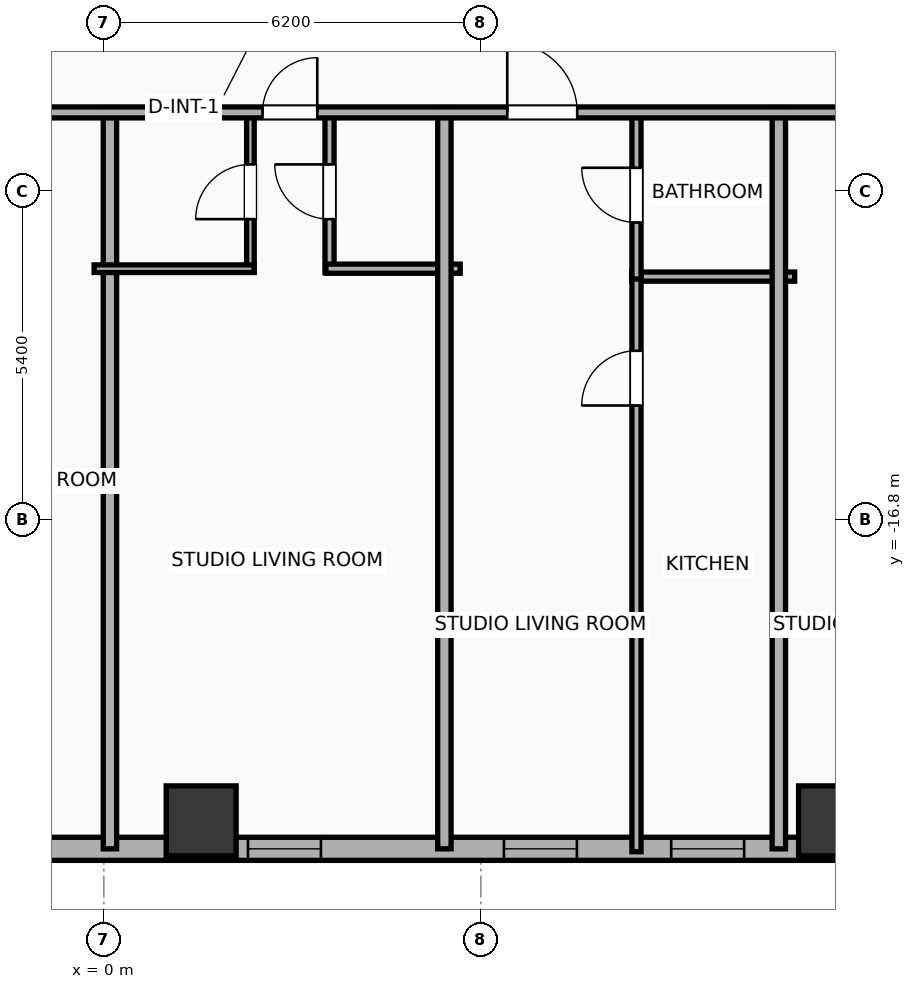
"""IFC4 building model, lengths in metres.
Left out: names, types, materials, properties, quantities, classifications, styles, units other than length and angle.
Written with IfcOpenShell. Run it as: python <this file> out.ifc"""

import sys

from ifc_helpers import new_model, si_unit, direction, frame, frame_2d, origin, origin_2d, place, context, subcontext, project, spatial, rectangle, hollow_rectangle, extrude, element, fill, save


model = new_model("IFC4")
c1 = context("Model", 3, precision=1e-05, world=origin(), true_north=direction((0.0, 1.0)))
c2 = subcontext(c1, "Body", "Model", "MODEL_VIEW")
j1 = project(units=[si_unit("LENGTHUNIT", "METRE"), si_unit("PLANEANGLEUNIT", "RADIAN")], contexts=[c1])
p1 = place(None, origin())
s1 = spatial("IfcSite", under=j1, at=p1, CompositionType="ELEMENT")
p2 = place(p1, origin())
s2 = spatial("IfcBuilding", under=s1, at=p2, CompositionType="ELEMENT")
p3 = place(p2, frame((0.0, 0.0, 45.5)))
s3 = spatial("IfcBuildingStorey", under=s2, at=p3, CompositionType="ELEMENT", Elevation=45.5)
for number, where, z_axis, x_axis in (
    (1, (1.6, -21.75, 0.0), (0.0, 0.0, 1.0), (1.0, 0.0, 0.0)),
    (2, (12.0, -21.75, 0.0), (0.0, 0.0, 1.0), (1.0, 0.0, 0.0)),
):
    element("IfcColumn", number, at=place(p3, frame(where, z_axis=z_axis, x_axis=x_axis)), inside=s3, PredefinedType="COLUMN", context=c2, shape_type="SweptSolid", body=[
        extrude(hollow_rectangle(XDim=1.15, YDim=1.15, WallThickness=0.04, at=origin_2d()), origin(), (0.0, 0.0, 1.0), 3.9),
    ])
p4 = place(p3, frame((22.381, -22.21, 0.0), z_axis=(0.0, 0.0, 1.0), x_axis=(-1.0, 0.0, 0.0)))
e3 = element("IfcWall", 3, at=p4, inside=s3, PredefinedType="ELEMENTEDWALL", context=c2, shape_type="SweptSolid", body=[
    extrude(rectangle(XDim=51.963, YDim=0.38, at=frame_2d((25.981, 0.0))), origin(), (0.0, 0.0, 1.0), 3.65),
])
p5 = place(p4, frame((42.952, 0.0, 0.75)))
e4 = element("IfcOpeningElement", 4, at=p5, cuts=e3, PredefinedType="OPENING", context=c2, shape_type="SweptSolid", body=[
    extrude(rectangle(XDim=2.4, YDim=2.1, at=frame_2d((1.2, 1.05))), frame((0.0, 0.2, 0.0), z_axis=(0.0, -1.0, 0.0), x_axis=(1.0, 0.0, 0.0)), (0.0, 0.0, 1.0), 0.4),
])
p6 = place(p4, frame((49.847, 0.0, 0.75)))
e5 = element("IfcOpeningElement", 5, at=p6, cuts=e3, PredefinedType="OPENING", context=c2, shape_type="SweptSolid", body=[
    extrude(rectangle(XDim=1.2, YDim=2.05, at=frame_2d((0.6, 1.025))), frame((0.0, 0.2, 0.0), z_axis=(0.0, -1.0, 0.0), x_axis=(1.0, 0.0, 0.0)), (0.0, 0.0, 1.0), 0.4),
])
p7 = place(p4, frame((47.445, 0.0, 0.75)))
e6 = element("IfcOpeningElement", 6, at=p7, cuts=e3, PredefinedType="OPENING", context=c2, shape_type="SweptSolid", body=[
    extrude(rectangle(XDim=1.2, YDim=2.05, at=frame_2d((0.6, 1.025))), frame((0.0, 0.2, 0.0), z_axis=(0.0, -1.0, 0.0), x_axis=(1.0, 0.0, 0.0)), (0.0, 0.0, 1.0), 0.4),
])
p8 = place(p4, frame((39.526, 0.0, 0.75)))
e7 = element("IfcOpeningElement", 7, at=p8, cuts=e3, PredefinedType="OPENING", context=c2, shape_type="SweptSolid", body=[
    extrude(rectangle(XDim=1.2, YDim=2.05, at=frame_2d((0.6, 1.025))), frame((0.0, 0.2, 0.0), z_axis=(0.0, -1.0, 0.0), x_axis=(1.0, 0.0, 0.0)), (0.0, 0.0, 1.0), 0.4),
])
p9 = place(p4, frame((33.018, 0.0, 0.75)))
e8 = element("IfcOpeningElement", 8, at=p9, cuts=e3, PredefinedType="OPENING", context=c2, shape_type="SweptSolid", body=[
    extrude(rectangle(XDim=1.2, YDim=2.05, at=frame_2d((0.6, 1.025))), frame((0.0, 0.2, 0.0), z_axis=(0.0, -1.0, 0.0), x_axis=(1.0, 0.0, 0.0)), (0.0, 0.0, 1.0), 0.4),
])
p10 = place(p4, frame((36.813, 0.0, 0.75)))
e9 = element("IfcOpeningElement", 9, at=p10, cuts=e3, PredefinedType="OPENING", context=c2, shape_type="SweptSolid", body=[
    extrude(rectangle(XDim=1.2, YDim=2.05, at=frame_2d((0.6, 1.025))), frame((0.0, 0.2, 0.0), z_axis=(0.0, -1.0, 0.0), x_axis=(1.0, 0.0, 0.0)), (0.0, 0.0, 1.0), 0.4),
])
p11 = place(p4, frame((28.886, 0.0, 0.75)))
e10 = element("IfcOpeningElement", 10, at=p11, cuts=e3, PredefinedType="OPENING", context=c2, shape_type="SweptSolid", body=[
    extrude(rectangle(XDim=1.2, YDim=2.05, at=frame_2d((0.6, 1.025))), frame((0.0, 0.2, 0.0), z_axis=(0.0, -1.0, 0.0), x_axis=(1.0, 0.0, 0.0)), (0.0, 0.0, 1.0), 0.4),
])
p12 = place(p4, frame((23.306, 0.0, 0.75)))
e11 = element("IfcOpeningElement", 11, at=p12, cuts=e3, PredefinedType="OPENING", context=c2, shape_type="SweptSolid", body=[
    extrude(rectangle(XDim=1.2, YDim=2.05, at=frame_2d((0.6, 1.025))), frame((0.0, 0.2, 0.0), z_axis=(0.0, -1.0, 0.0), x_axis=(1.0, 0.0, 0.0)), (0.0, 0.0, 1.0), 0.4),
])
p13 = place(p4, frame((26.056, 0.0, 0.75)))
e12 = element("IfcOpeningElement", 12, at=p13, cuts=e3, PredefinedType="OPENING", context=c2, shape_type="SweptSolid", body=[
    extrude(rectangle(XDim=1.2, YDim=2.05, at=frame_2d((0.6, 1.025))), frame((0.0, 0.2, 0.0), z_axis=(0.0, -1.0, 0.0), x_axis=(1.0, 0.0, 0.0)), (0.0, 0.0, 1.0), 0.4),
])
p14 = place(p4, frame((18.811, 0.0, 0.75)))
e13 = element("IfcOpeningElement", 13, at=p14, cuts=e3, PredefinedType="OPENING", context=c2, shape_type="SweptSolid", body=[
    extrude(rectangle(XDim=1.2, YDim=2.05, at=frame_2d((0.6, 1.025))), frame((0.0, 0.2, 0.0), z_axis=(0.0, -1.0, 0.0), x_axis=(1.0, 0.0, 0.0)), (0.0, 0.0, 1.0), 0.4),
])
p15 = place(p4, frame((14.602, 0.0, 0.75)))
e14 = element("IfcOpeningElement", 14, at=p15, cuts=e3, PredefinedType="OPENING", context=c2, shape_type="SweptSolid", body=[
    extrude(rectangle(XDim=1.2, YDim=2.05, at=frame_2d((0.6, 1.025))), frame((0.0, 0.2, 0.0), z_axis=(0.0, -1.0, 0.0), x_axis=(1.0, 0.0, 0.0)), (0.0, 0.0, 1.0), 0.4),
])
p16 = place(p4, frame((11.852, 0.0, 0.75)))
e15 = element("IfcOpeningElement", 15, at=p16, cuts=e3, PredefinedType="OPENING", context=c2, shape_type="SweptSolid", body=[
    extrude(rectangle(XDim=1.2, YDim=2.05, at=frame_2d((0.6, 1.025))), frame((0.0, 0.2, 0.0), z_axis=(0.0, -1.0, 0.0), x_axis=(1.0, 0.0, 0.0)), (0.0, 0.0, 1.0), 0.4),
])
p17 = place(p4, frame((8.316, 0.0, 0.75)))
e16 = element("IfcOpeningElement", 16, at=p17, cuts=e3, PredefinedType="OPENING", context=c2, shape_type="SweptSolid", body=[
    extrude(rectangle(XDim=1.2, YDim=2.05, at=frame_2d((0.6, 1.025))), frame((0.0, 0.2, 0.0), z_axis=(0.0, -1.0, 0.0), x_axis=(1.0, 0.0, 0.0)), (0.0, 0.0, 1.0), 0.4),
])
p18 = place(p4, frame((6.286, 0.0, 0.75)))
e17 = element("IfcOpeningElement", 17, at=p18, cuts=e3, PredefinedType="OPENING", context=c2, shape_type="SweptSolid", body=[
    extrude(rectangle(XDim=1.2, YDim=2.05, at=frame_2d((0.6, 1.025))), frame((0.0, 0.2, 0.0), z_axis=(0.0, -1.0, 0.0), x_axis=(1.0, 0.0, 0.0)), (0.0, 0.0, 1.0), 0.4),
])
p19 = place(p4, frame((3.737, 0.0, 0.75)))
e18 = element("IfcOpeningElement", 18, at=p19, cuts=e3, PredefinedType="OPENING", context=c2, shape_type="SweptSolid", body=[
    extrude(rectangle(XDim=1.2, YDim=2.05, at=frame_2d((0.6, 1.025))), frame((0.0, 0.2, 0.0), z_axis=(0.0, -1.0, 0.0), x_axis=(1.0, 0.0, 0.0)), (0.0, 0.0, 1.0), 0.4),
])
p20 = place(p4, frame((1.291, 0.0, 0.75)))
e19 = element("IfcOpeningElement", 19, at=p20, cuts=e3, PredefinedType="OPENING", context=c2, shape_type="SweptSolid", body=[
    extrude(rectangle(XDim=1.2, YDim=2.05, at=frame_2d((0.6, 1.025))), frame((0.0, 0.2, 0.0), z_axis=(0.0, -1.0, 0.0), x_axis=(1.0, 0.0, 0.0)), (0.0, 0.0, 1.0), 0.4),
])
p21 = place(p3, frame((0.1, -22.21, 0.0), z_axis=(0.0, 0.0, 1.0), x_axis=(0.0, 1.0, 0.0)))
e20 = element("IfcWall", 20, at=p21, inside=s3, PredefinedType="PARTITIONING", context=c2, shape_type="SweptSolid", body=[
    extrude(rectangle(XDim=12.19, YDim=0.22, at=frame_2d((6.095, 0.0))), origin(), (0.0, 0.0, 1.0), 3.65),
])
p22 = place(p3, frame((2.41, -12.73, 0.0), z_axis=(0.0, 0.0, 1.0), x_axis=(0.0, 1.0, 0.0)))
e21 = element("IfcWall", 21, at=p22, inside=s3, PredefinedType="PARTITIONING", context=c2, shape_type="SweptSolid", body=[
    extrude(rectangle(XDim=2.65, YDim=0.125, at=frame_2d((1.325, 0.0))), origin(), (0.0, 0.0, 1.0), 3.65),
])
p23 = place(p22, frame((0.875, 0.0, 0.0)))
e22 = element("IfcOpeningElement", 22, at=p23, cuts=e21, PredefinedType="OPENING", context=c2, shape_type="SweptSolid", body=[
    extrude(rectangle(XDim=0.9, YDim=2.05, at=frame_2d((0.45, 1.025))), frame((0.0, 0.073, 0.0), z_axis=(0.0, -1.0, 0.0), x_axis=(1.0, 0.0, 0.0)), (0.0, 0.0, 1.0), 0.145),
])
p24 = place(p3, frame((3.711, -12.73, 0.0), z_axis=(0.0, 0.0, 1.0), x_axis=(0.0, 1.0, 0.0)))
e23 = element("IfcWall", 23, at=p24, inside=s3, PredefinedType="PLUMBINGWALL", context=c2, shape_type="SweptSolid", body=[
    extrude(rectangle(XDim=2.65, YDim=0.15, at=frame_2d((1.325, 0.0))), origin(), (0.0, 0.0, 1.0), 2.94),
])
p25 = place(p24, frame((0.875, 0.0, 0.0)))
e24 = element("IfcOpeningElement", 24, at=p25, cuts=e23, PredefinedType="OPENING", context=c2, shape_type="SweptSolid", body=[
    extrude(rectangle(XDim=0.9, YDim=2.05, at=frame_2d((0.45, 1.025))), frame((0.0, 0.085, 0.0), z_axis=(0.0, -1.0, 0.0), x_axis=(1.0, 0.0, 0.0)), (0.0, 0.0, 1.0), 0.17),
])
p26 = place(p3, frame((-0.16, -12.67, 0.0), z_axis=(0.0, 0.0, 1.0), x_axis=(1.0, 0.0, 0.0)))
e25 = element("IfcWall", 25, at=p26, inside=s3, PredefinedType="PARTITIONING", context=c2, shape_type="SweptSolid", body=[
    extrude(rectangle(XDim=2.63, YDim=0.125, at=frame_2d((1.315, 0.0))), origin(), (0.0, 0.0, 1.0), 3.65),
])
p27 = place(p3, frame((3.651, -12.67, 0.0), z_axis=(0.0, 0.0, 1.0), x_axis=(1.0, 0.0, 0.0)))
e26 = element("IfcWall", 26, at=p27, inside=s3, PredefinedType="PLUMBINGWALL", context=c2, shape_type="SweptSolid", body=[
    extrude(rectangle(XDim=2.209, YDim=0.15, at=frame_2d((1.104, 0.0))), origin(), (0.0, 0.0, 1.0), 3.65),
])
p28 = place(p3, frame((5.6, -22.21, 0.0), z_axis=(0.0, 0.0, 1.0), x_axis=(0.0, 1.0, 0.0)))
e27 = element("IfcWall", 27, at=p28, inside=s3, PredefinedType="PARTITIONING", context=c2, shape_type="SweptSolid", body=[
    extrude(rectangle(XDim=12.19, YDim=0.22, at=frame_2d((6.095, 0.0))), origin(), (0.0, 0.0, 1.0), 3.65),
])
p29 = place(p3, frame((8.679, -12.8, 0.0), z_axis=(0.0, 0.0, 1.0), x_axis=(1.0, 0.0, 0.0)))
e28 = element("IfcWall", 28, at=p29, inside=s3, PredefinedType="PLUMBINGWALL", context=c2, shape_type="SweptSolid", body=[
    extrude(rectangle(XDim=2.681, YDim=0.15, at=frame_2d((1.341, 0.0))), origin(), (0.0, 0.0, 1.0), 3.65),
])
p30 = place(p3, frame((8.759, -22.258, 0.0), z_axis=(0.0, 0.0, 1.0), x_axis=(0.0, 1.0, 0.0)))
e29 = element("IfcWall", 29, at=p30, inside=s3, PredefinedType="PLUMBINGWALL", context=c2, shape_type="SweptSolid", body=[
    extrude(rectangle(XDim=9.498, YDim=0.15, at=frame_2d((4.749, 0.0))), origin(), (0.0, 0.0, 1.0), 3.65),
])
p31 = place(p30, frame((7.338, 0.0, 0.0)))
e30 = element("IfcOpeningElement", 30, at=p31, cuts=e29, PredefinedType="OPENING", context=c2, shape_type="SweptSolid", body=[
    extrude(rectangle(XDim=0.9, YDim=2.05, at=frame_2d((0.45, 1.025))), frame((0.0, 0.085, 0.0), z_axis=(0.0, -1.0, 0.0), x_axis=(1.0, 0.0, 0.0)), (0.0, 0.0, 1.0), 0.17),
])
p32 = place(p3, frame((8.759, -12.84, 0.0), z_axis=(0.0, 0.0, 1.0), x_axis=(0.0, 1.0, 0.0)))
e31 = element("IfcWall", 31, at=p32, inside=s3, PredefinedType="PLUMBINGWALL", context=c2, shape_type="SweptSolid", body=[
    extrude(rectangle(XDim=2.76, YDim=0.15, at=frame_2d((1.38, 0.0))), origin(), (0.0, 0.0, 1.0), 3.65),
])
p33 = place(p32, frame((0.93, 0.0, 0.0)))
e32 = element("IfcOpeningElement", 32, at=p33, cuts=e31, PredefinedType="OPENING", context=c2, shape_type="SweptSolid", body=[
    extrude(rectangle(XDim=0.9, YDim=2.05, at=frame_2d((0.45, 1.025))), frame((0.0, 0.085, 0.0), z_axis=(0.0, -1.0, 0.0), x_axis=(1.0, 0.0, 0.0)), (0.0, 0.0, 1.0), 0.17),
])
p34 = place(p3, frame((11.1, -22.21, 0.0), z_axis=(0.0, 0.0, 1.0), x_axis=(0.0, 1.0, 0.0)))
e33 = element("IfcWall", 33, at=p34, inside=s3, PredefinedType="PARTITIONING", context=c2, shape_type="SweptSolid", body=[
    extrude(rectangle(XDim=12.19, YDim=0.22, at=frame_2d((6.095, 0.0))), origin(), (0.0, 0.0, 1.0), 3.65),
])
p35 = place(p3, frame((-33.41, -10.1, 0.0), z_axis=(0.0, 0.0, 1.0), x_axis=(1.0, 0.0, 0.0)))
e34 = element("IfcWall", 34, at=p35, inside=s3, PredefinedType="PARTITIONING", context=c2, shape_type="SweptSolid", body=[
    extrude(rectangle(XDim=59.62, YDim=0.18, at=frame_2d((29.81, 0.0))), origin(), (0.0, 0.0, 1.0), 3.65),
])
p36 = place(p35, frame((2.746, 0.0, 0.0)))
e35 = element("IfcOpeningElement", 35, at=p36, cuts=e34, PredefinedType="OPENING", context=c2, shape_type="SweptSolid", body=[
    extrude(rectangle(XDim=0.9, YDim=2.05, at=frame_2d((0.45, 1.025))), frame((0.0, 0.1, 0.0), z_axis=(0.0, -1.0, 0.0), x_axis=(1.0, 0.0, 0.0)), (0.0, 0.0, 1.0), 0.2),
])
p37 = place(p35, frame((11.552, 0.0, 0.0)))
e36 = element("IfcOpeningElement", 36, at=p37, cuts=e34, PredefinedType="OPENING", context=c2, shape_type="SweptSolid", body=[
    extrude(rectangle(XDim=1.15, YDim=2.05, at=frame_2d((0.575, 1.025))), frame((0.0, 0.1, 0.0), z_axis=(0.0, -1.0, 0.0), x_axis=(1.0, 0.0, 0.0)), (0.0, 0.0, 1.0), 0.2),
])
p38 = place(p35, frame((22.379, 0.0, 0.0)))
e37 = element("IfcOpeningElement", 37, at=p38, cuts=e34, PredefinedType="OPENING", context=c2, shape_type="SweptSolid", body=[
    extrude(rectangle(XDim=1.15, YDim=2.05, at=frame_2d((0.575, 1.025))), frame((0.0, 0.1, 0.0), z_axis=(0.0, -1.0, 0.0), x_axis=(1.0, 0.0, 0.0)), (0.0, 0.0, 1.0), 0.2),
])
p39 = place(p35, frame((31.28, 0.0, 0.0)))
e38 = element("IfcOpeningElement", 38, at=p39, cuts=e34, PredefinedType="OPENING", context=c2, shape_type="SweptSolid", body=[
    extrude(rectangle(XDim=1.15, YDim=2.05, at=frame_2d((0.575, 1.025))), frame((0.0, 0.1, 0.0), z_axis=(0.0, -1.0, 0.0), x_axis=(1.0, 0.0, 0.0)), (0.0, 0.0, 1.0), 0.2),
])
p40 = place(p35, frame((36.02, 0.0, 0.0)))
e39 = element("IfcOpeningElement", 39, at=p40, cuts=e34, PredefinedType="OPENING", context=c2, shape_type="SweptSolid", body=[
    extrude(rectangle(XDim=0.9, YDim=2.05, at=frame_2d((0.45, 1.025))), frame((0.0, 0.1, 0.0), z_axis=(0.0, -1.0, 0.0), x_axis=(1.0, 0.0, 0.0)), (0.0, 0.0, 1.0), 0.2),
])
p41 = place(p35, frame((40.044, 0.0, 0.0)))
e40 = element("IfcOpeningElement", 40, at=p41, cuts=e34, PredefinedType="OPENING", context=c2, shape_type="SweptSolid", body=[
    extrude(rectangle(XDim=1.15, YDim=2.05, at=frame_2d((0.575, 1.025))), frame((0.0, 0.1, 0.0), z_axis=(0.0, -1.0, 0.0), x_axis=(1.0, 0.0, 0.0)), (0.0, 0.0, 1.0), 0.2),
])
p42 = place(p35, frame((45.613, 0.0, 0.0)))
e41 = element("IfcOpeningElement", 41, at=p42, cuts=e34, PredefinedType="OPENING", context=c2, shape_type="SweptSolid", body=[
    extrude(rectangle(XDim=1.15, YDim=2.05, at=frame_2d((0.575, 1.025))), frame((0.0, 0.1, 0.0), z_axis=(0.0, -1.0, 0.0), x_axis=(1.0, 0.0, 0.0)), (0.0, 0.0, 1.0), 0.2),
])
p43 = place(p35, frame((54.174, 0.0, 0.0)))
e42 = element("IfcOpeningElement", 42, at=p43, cuts=e34, PredefinedType="OPENING", context=c2, shape_type="SweptSolid", body=[
    extrude(rectangle(XDim=1.15, YDim=2.05, at=frame_2d((0.575, 1.025))), frame((0.0, 0.1, 0.0), z_axis=(0.0, -1.0, 0.0), x_axis=(1.0, 0.0, 0.0)), (0.0, 0.0, 1.0), 0.2),
])
p44 = place(p14, origin())
e43 = element("IfcWindow", 43, at=p44, inside=s3, PartitioningType="SINGLE_PANEL", PredefinedType="WINDOW", context=c2, shape_type="SweptSolid", body=[
    extrude(rectangle(XDim=1.2, YDim=2.05, at=frame_2d((0.6, 1.025))), frame((0.0, 0.03, 0.0), z_axis=(0.0, -1.0, 0.0), x_axis=(1.0, 0.0, 0.0)), (0.0, 0.0, 1.0), 0.06),
])
fill(e13, e43)
p45 = place(p15, origin())
e44 = element("IfcWindow", 44, at=p45, inside=s3, PartitioningType="SINGLE_PANEL", PredefinedType="WINDOW", context=c2, shape_type="SweptSolid", body=[
    extrude(rectangle(XDim=1.2, YDim=2.05, at=frame_2d((0.6, 1.025))), frame((0.0, 0.03, 0.0), z_axis=(0.0, -1.0, 0.0), x_axis=(1.0, 0.0, 0.0)), (0.0, 0.0, 1.0), 0.06),
])
fill(e14, e44)
p46 = place(p16, origin())
e45 = element("IfcWindow", 45, at=p46, inside=s3, PartitioningType="SINGLE_PANEL", PredefinedType="WINDOW", context=c2, shape_type="SweptSolid", body=[
    extrude(rectangle(XDim=1.2, YDim=2.05, at=frame_2d((0.6, 1.025))), frame((0.0, 0.03, 0.0), z_axis=(0.0, -1.0, 0.0), x_axis=(1.0, 0.0, 0.0)), (0.0, 0.0, 1.0), 0.06),
])
fill(e15, e45)
p47 = place(p23, origin())
e46 = element("IfcDoor", 46, at=p47, inside=s3, OperationType="SINGLE_SWING_LEFT", PredefinedType="DOOR", context=c2, shape_type="SweptSolid", body=[
    extrude(rectangle(XDim=0.9, YDim=2.05, at=frame_2d((0.45, 1.025))), frame((0.0, 0.025, 0.0), z_axis=(0.0, -1.0, 0.0), x_axis=(1.0, 0.0, 0.0)), (0.0, 0.0, 1.0), 0.05),
])
fill(e22, e46)
p48 = place(p25, origin())
e47 = element("IfcDoor", 47, at=p48, inside=s3, OperationType="SINGLE_SWING_RIGHT", PredefinedType="DOOR", context=c2, shape_type="SweptSolid", body=[
    extrude(rectangle(XDim=0.9, YDim=2.05, at=frame_2d((0.45, 1.025))), frame((0.0, 0.025, 0.0), z_axis=(0.0, -1.0, 0.0), x_axis=(1.0, 0.0, 0.0)), (0.0, 0.0, 1.0), 0.05),
])
fill(e24, e47)
p49 = place(p31, origin())
e48 = element("IfcDoor", 48, at=p49, inside=s3, OperationType="SINGLE_SWING_LEFT", PredefinedType="DOOR", context=c2, shape_type="SweptSolid", body=[
    extrude(rectangle(XDim=0.9, YDim=2.05, at=frame_2d((0.45, 1.025))), frame((0.0, 0.025, 0.0), z_axis=(0.0, -1.0, 0.0), x_axis=(1.0, 0.0, 0.0)), (0.0, 0.0, 1.0), 0.05),
])
fill(e30, e48)
p50 = place(p33, origin())
e49 = element("IfcDoor", 49, at=p50, inside=s3, OperationType="SINGLE_SWING_RIGHT", PredefinedType="DOOR", context=c2, shape_type="SweptSolid", body=[
    extrude(rectangle(XDim=0.9, YDim=2.05, at=frame_2d((0.45, 1.025))), frame((0.0, 0.025, 0.0), z_axis=(0.0, -1.0, 0.0), x_axis=(1.0, 0.0, 0.0)), (0.0, 0.0, 1.0), 0.05),
])
fill(e32, e49)
p51 = place(p40, origin())
e50 = element("IfcDoor", 50, at=p51, inside=s3, OperationType="SINGLE_SWING_RIGHT", PredefinedType="DOOR", context=c2, shape_type="SweptSolid", body=[
    extrude(rectangle(XDim=0.9, YDim=2.05, at=frame_2d((0.45, 1.025))), frame((0.0, 0.025, 0.0), z_axis=(0.0, -1.0, 0.0), x_axis=(1.0, 0.0, 0.0)), (0.0, 0.0, 1.0), 0.05),
])
fill(e39, e50)
p52 = place(p41, origin())
e51 = element("IfcDoor", 51, at=p52, inside=s3, OperationType="SINGLE_SWING_LEFT", PredefinedType="DOOR", context=c2, shape_type="SweptSolid", body=[
    extrude(rectangle(XDim=1.15, YDim=2.05, at=frame_2d((0.575, 1.025))), frame((0.0, 0.025, 0.0), z_axis=(0.0, -1.0, 0.0), x_axis=(1.0, 0.0, 0.0)), (0.0, 0.0, 1.0), 0.05),
])
fill(e40, e51)
save(model, sys.argv[1])
